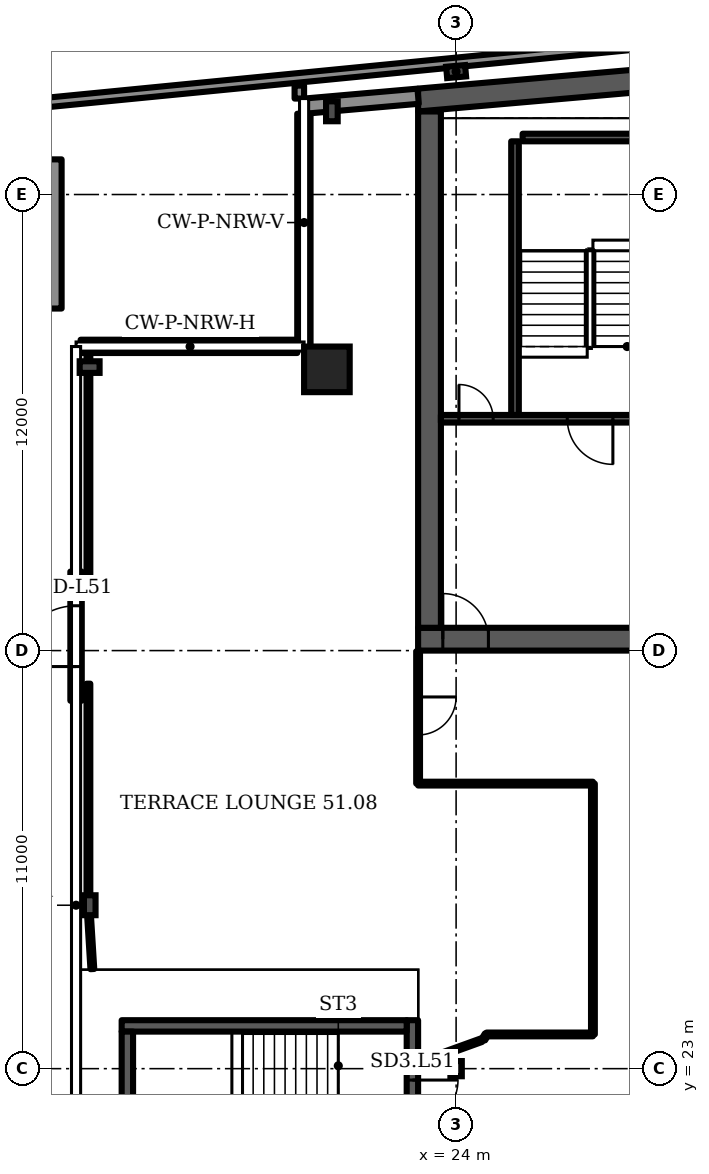
"""IFC4 building model, lengths in metres.
Left out: names, types, materials, properties, quantities, classifications, styles, units other than length and angle.
Written with IfcOpenShell. Run it as: python <this file> out.ifc"""

import sys

from ifc_helpers import new_model, si_unit, direction, frame, frame_2d, origin, origin_2d, place, context, subcontext, project, spatial, polyline, rectangle, i_section, outline, extrude, element, fill, save


model = new_model("IFC4")
c1 = context("Model", 3, precision=1e-05, world=origin(), true_north=direction((0.0, 1.0)))
c2 = subcontext(c1, "Body", "Model", "MODEL_VIEW")
j1 = project(units=[si_unit("LENGTHUNIT", "METRE"), si_unit("PLANEANGLEUNIT", "RADIAN")], contexts=[c1])
p1 = place(None, origin())
s1 = spatial("IfcSite", under=j1, at=p1, CompositionType="ELEMENT")
p2 = place(p1, origin())
s2 = spatial("IfcBuilding", under=s1, at=p2, CompositionType="ELEMENT")
p3 = place(p2, frame((0.0, 0.0, 207.1)))
s3 = spatial("IfcBuildingStorey", under=s2, at=p3, CompositionType="ELEMENT", Elevation=207.1)
p4 = place(p3, frame((0.0, 0.0, -0.0)))
e1 = element("IfcWall", 1, at=p4, inside=s3, PredefinedType="SHEAR", context=c2, shape_type="SweptSolid", body=[
    extrude(outline(polyline([(23.0, 48.185), (40.5, 49.716), (58.0, 48.185), (58.0, 48.787), (40.5, 50.318), (23.0, 48.787), (23.0, 48.185)])), origin(), (0.0, 0.0, 1.0), 3.6),
])
p5 = place(p3, frame((23.0, 34.3, 0.0), z_axis=(0.0, 0.0, 1.0), x_axis=(1.0, 0.0, 0.0)))
e2 = element("IfcWall", 2, at=p5, inside=s3, PredefinedType="SHEAR", context=c2, shape_type="SweptSolid", body=[
    extrude(rectangle(XDim=35.0, YDim=0.6, at=frame_2d((17.5, 0.0))), origin(), (0.0, 0.0, 1.0), 3.6),
])
p6 = place(p5, frame((0.65, 0.0, 0.0)))
e3 = element("IfcOpeningElement", 3, at=p6, cuts=e2, PredefinedType="OPENING", context=c2, shape_type="SweptSolid", body=[
    extrude(rectangle(XDim=1.2, YDim=2.1, at=frame_2d((0.6, 1.05))), frame((0.0, 0.31, 0.0), z_axis=(0.0, -1.0, 0.0), x_axis=(1.0, 0.0, 0.0)), (0.0, 0.0, 1.0), 0.62),
])
p7 = place(p5, frame((7.717, 0.0, 0.0)))
e4 = element("IfcOpeningElement", 4, at=p7, cuts=e2, PredefinedType="OPENING", context=c2, shape_type="SweptSolid", body=[
    extrude(rectangle(XDim=1.1, YDim=2.1, at=frame_2d((0.55, 1.05))), frame((0.0, 0.31, 0.0), z_axis=(0.0, -1.0, 0.0), x_axis=(1.0, 0.0, 0.0)), (0.0, 0.0, 1.0), 0.62),
])
p8 = place(p5, frame((12.183, 0.0, 0.0)))
e5 = element("IfcOpeningElement", 5, at=p8, cuts=e2, PredefinedType="OPENING", context=c2, shape_type="SweptSolid", body=[
    extrude(rectangle(XDim=1.1, YDim=2.1, at=frame_2d((0.55, 1.05))), frame((0.0, 0.31, 0.0), z_axis=(0.0, -1.0, 0.0), x_axis=(1.0, 0.0, 0.0)), (0.0, 0.0, 1.0), 0.62),
])
p9 = place(p5, frame((9.8, 0.0, 0.0)))
e6 = element("IfcOpeningElement", 6, at=p9, cuts=e2, PredefinedType="OPENING", context=c2, shape_type="SweptSolid", body=[
    extrude(rectangle(XDim=1.4, YDim=2.1, at=frame_2d((0.7, 1.05))), frame((0.0, 0.31, 0.0), z_axis=(0.0, -1.0, 0.0), x_axis=(1.0, 0.0, 0.0)), (0.0, 0.0, 1.0), 0.62),
])
p10 = place(p5, frame((14.717, 0.0, 0.0)))
e7 = element("IfcOpeningElement", 7, at=p10, cuts=e2, PredefinedType="OPENING", context=c2, shape_type="SweptSolid", body=[
    extrude(rectangle(XDim=1.1, YDim=2.1, at=frame_2d((0.55, 1.05))), frame((0.0, 0.31, 0.0), z_axis=(0.0, -1.0, 0.0), x_axis=(1.0, 0.0, 0.0)), (0.0, 0.0, 1.0), 0.62),
])
p11 = place(p5, frame((16.95, 0.0, 0.0)))
e8 = element("IfcOpeningElement", 8, at=p11, cuts=e2, PredefinedType="OPENING", context=c2, shape_type="SweptSolid", body=[
    extrude(rectangle(XDim=1.1, YDim=2.1, at=frame_2d((0.55, 1.05))), frame((0.0, 0.31, 0.0), z_axis=(0.0, -1.0, 0.0), x_axis=(1.0, 0.0, 0.0)), (0.0, 0.0, 1.0), 0.62),
])
p12 = place(p5, frame((19.183, 0.0, 0.0)))
e9 = element("IfcOpeningElement", 9, at=p12, cuts=e2, PredefinedType="OPENING", context=c2, shape_type="SweptSolid", body=[
    extrude(rectangle(XDim=1.1, YDim=2.1, at=frame_2d((0.55, 1.05))), frame((0.0, 0.31, 0.0), z_axis=(0.0, -1.0, 0.0), x_axis=(1.0, 0.0, 0.0)), (0.0, 0.0, 1.0), 0.62),
])
p13 = place(p5, frame((26.15, 0.0, 0.0)))
e10 = element("IfcOpeningElement", 10, at=p13, cuts=e2, PredefinedType="OPENING", context=c2, shape_type="SweptSolid", body=[
    extrude(rectangle(XDim=1.2, YDim=2.1, at=frame_2d((0.6, 1.05))), frame((0.0, 0.31, 0.0), z_axis=(0.0, -1.0, 0.0), x_axis=(1.0, 0.0, 0.0)), (0.0, 0.0, 1.0), 0.62),
])
p14 = place(p5, frame((28.767, 0.0, 0.0)))
e11 = element("IfcOpeningElement", 11, at=p14, cuts=e2, PredefinedType="OPENING", context=c2, shape_type="SweptSolid", body=[
    extrude(rectangle(XDim=1.0, YDim=2.1, at=frame_2d((0.5, 1.05))), frame((0.0, 0.31, 0.0), z_axis=(0.0, -1.0, 0.0), x_axis=(1.0, 0.0, 0.0)), (0.0, 0.0, 1.0), 0.62),
])
p15 = place(p5, frame((33.083, 0.0, 0.0)))
e12 = element("IfcOpeningElement", 12, at=p15, cuts=e2, PredefinedType="OPENING", context=c2, shape_type="SweptSolid", body=[
    extrude(rectangle(XDim=1.0, YDim=2.1, at=frame_2d((0.5, 1.05))), frame((0.0, 0.31, 0.0), z_axis=(0.0, -1.0, 0.0), x_axis=(1.0, 0.0, 0.0)), (0.0, 0.0, 1.0), 0.62),
])
p16 = place(p5, frame((30.8, 0.0, 0.0)))
e13 = element("IfcOpeningElement", 13, at=p16, cuts=e2, PredefinedType="OPENING", context=c2, shape_type="SweptSolid", body=[
    extrude(rectangle(XDim=1.4, YDim=2.1, at=frame_2d((0.7, 1.05))), frame((0.0, 0.31, 0.0), z_axis=(0.0, -1.0, 0.0), x_axis=(1.0, 0.0, 0.0)), (0.0, 0.0, 1.0), 0.62),
])
p17 = place(p3, frame((23.3, 34.6, 0.0), z_axis=(0.0, 0.0, 1.0), x_axis=(0.0, 1.0, 0.0)))
e14 = element("IfcWall", 14, at=p17, inside=s3, PredefinedType="SHEAR", context=c2, shape_type="SweptSolid", body=[
    extrude(rectangle(XDim=13.585, YDim=0.6, at=frame_2d((6.792, 0.0))), origin(), (0.0, 0.0, 1.0), 3.6),
])
p18 = place(p3, frame((20.6, 41.4, 0.0), z_axis=(0.0, 0.0, 1.0), x_axis=(1.0, 0.0, 0.0)))
e15 = element("IfcColumn", 15, at=p18, inside=s3, PredefinedType="COLUMN", context=c2, shape_type="SweptSolid", body=[
    extrude(rectangle(XDim=1.2, YDim=1.2, at=origin_2d()), origin(), (0.0, 0.0, 1.0), 3.6),
])
for number, where, z_axis, x_axis in (
    (16, (20.731, 48.19, 0.0), (0.0, 0.0, 1.0), (-1.0, 0.0, 0.0)),
    (17, (14.357, 41.46, 0.0), (0.0, 0.0, 1.0), (0.0, 1.0, 0.0)),
    (18, (14.36, 27.3, 0.0), (0.0, 0.0, 1.0), (-1.0, 0.0, 0.0)),
):
    element("IfcColumn", number, at=place(p3, frame(where, z_axis=z_axis, x_axis=x_axis)), inside=s3, PredefinedType="COLUMN", context=c2, shape_type="SweptSolid", body=[
        extrude(i_section(OverallWidth=0.306, OverallDepth=0.524, WebThickness=0.021, FlangeThickness=0.04, FilletRadius=0.027, at=origin_2d()), origin(), (0.0, 0.0, 1.0), 3.6),
    ])
p19 = place(p3, frame((24.0, 23.0, 0.0), z_axis=(0.0, 0.0, 1.0), x_axis=(1.0, 0.0, 0.0)))
e19 = element("IfcColumn", 19, at=p19, inside=s3, PredefinedType="COLUMN", context=c2, shape_type="SweptSolid", body=[
    extrude(i_section(OverallWidth=0.3, OverallDepth=0.4, WebThickness=0.013, FlangeThickness=0.024, FilletRadius=0.027, at=origin_2d()), origin(), (0.0, 0.0, 1.0), 3.6),
])
p20 = place(p3, frame((24.0, 49.235, 0.0), z_axis=(0.0, 0.0, 1.0), x_axis=(-0.087156, 0.996197, 0.0)))
e20 = element("IfcColumn", 20, at=p20, inside=s3, PredefinedType="COLUMN", context=c2, shape_type="SweptSolid", body=[
    extrude(i_section(OverallWidth=0.3, OverallDepth=0.5, WebThickness=0.014, FlangeThickness=0.028, FilletRadius=0.027, at=origin_2d()), origin(), (0.0, 0.0, 1.0), 3.6),
])
p21 = place(p3, frame((23.0, 48.587, 0.0), z_axis=(0.0, 0.0, 1.0), x_axis=(-0.996194, -0.087168, 0.0)))
e21 = element("IfcWall", 21, at=p21, inside=s3, PredefinedType="SOLIDWALL", context=c2, shape_type="SweptSolid", body=[
    extrude(rectangle(XDim=2.994, YDim=0.4, at=frame_2d((1.497, 0.0))), origin(), (0.0, 0.0, 1.0), 3.2),
])
p22 = place(p3, frame((13.135, 48.413, 0.0), z_axis=(0.0, 0.0, 1.0), x_axis=(0.995233, 0.097487, 0.0)))
e22 = element("IfcWall", 22, at=p22, inside=s3, PredefinedType="PARAPET", context=c2, shape_type="SweptSolid", body=[
    extrude(rectangle(XDim=23.979, YDim=0.25, at=frame_2d((11.99, 0.0))), origin(), (0.0, 0.0, 1.0), 1.1),
])
p23 = place(p3, frame((19.875, 48.525, 0.0), z_axis=(0.0, 0.0, 1.0), x_axis=(0.0, 1.0, 0.0)))
e23 = element("IfcWall", 23, at=p23, inside=s3, PredefinedType="PARAPET", context=c2, shape_type="SweptSolid", body=[
    extrude(rectangle(XDim=0.341, YDim=0.25, at=frame_2d((0.17, 0.0))), origin(), (0.0, 0.0, 1.0), 1.1),
])
p24 = place(p3, frame((13.32, 43.0, 0.0), z_axis=(0.0, 0.0, 1.0), x_axis=(0.0, 1.0, 0.0)))
e24 = element("IfcWall", 24, at=p24, inside=s3, PredefinedType="SOLIDWALL", context=c2, shape_type="SweptSolid", body=[
    extrude(rectangle(XDim=3.925, YDim=0.6, at=frame_2d((1.962, 0.0))), origin(), (0.0, 0.0, 1.0), 0.8),
])
p25 = place(p3, frame((19.995, 48.126, 0.0), z_axis=(0.0, 0.0, 1.0), x_axis=(0.0, -1.0, 0.0)))
e25 = element("IfcWall", 25, at=p25, inside=s3, PredefinedType="SOLIDWALL", context=c2, shape_type="SweptSolid", body=[
    extrude(rectangle(XDim=6.126, YDim=0.35, at=frame_2d((3.063, 0.0))), origin(), (0.0, 0.0, 1.0), 1.0),
])
p26 = place(p3, frame((19.82, 42.005, 0.0), z_axis=(0.0, 0.0, 1.0), x_axis=(-1.0, 0.0, 0.0)))
e26 = element("IfcWall", 26, at=p26, inside=s3, PredefinedType="SOLIDWALL", context=c2, shape_type="SweptSolid", body=[
    extrude(rectangle(XDim=5.7, YDim=0.35, at=frame_2d((2.85, 0.0))), origin(), (0.0, 0.0, 1.0), 1.0),
])
p27 = place(p3, frame((23.6, 40.1, 0.0), z_axis=(0.0, 0.0, 1.0), x_axis=(1.0, 0.0, 0.0)))
e27 = element("IfcWall", 27, at=p27, inside=s3, PredefinedType="SHEAR", context=c2, shape_type="SweptSolid", body=[
    extrude(rectangle(XDim=6.1, YDim=0.2, at=frame_2d((3.05, 0.0))), origin(), (0.0, 0.0, 1.0), 3.2),
])
p28 = place(p27, frame((3.325, 0.0, 0.0)))
e28 = element("IfcOpeningElement", 28, at=p28, cuts=e27, PredefinedType="OPENING", context=c2, shape_type="SweptSolid", body=[
    extrude(rectangle(XDim=1.2, YDim=2.1, at=frame_2d((0.6, 1.05))), frame((0.0, 0.11, 0.0), z_axis=(0.0, -1.0, 0.0), x_axis=(1.0, 0.0, 0.0)), (0.0, 0.0, 1.0), 0.22),
])
p29 = place(p27, frame((0.475, 0.0, 0.0)))
e29 = element("IfcOpeningElement", 29, at=p29, cuts=e27, PredefinedType="OPENING", context=c2, shape_type="SweptSolid", body=[
    extrude(rectangle(XDim=0.9, YDim=2.1, at=frame_2d((0.45, 1.05))), frame((0.0, 0.11, 0.0), z_axis=(0.0, -1.0, 0.0), x_axis=(1.0, 0.0, 0.0)), (0.0, 0.0, 1.0), 0.22),
])
p30 = place(p3, frame((25.55, 40.2, 0.0), z_axis=(0.0, 0.0, 1.0), x_axis=(0.0, 1.0, 0.0)))
e30 = element("IfcWall", 30, at=p30, inside=s3, PredefinedType="SHEAR", context=c2, shape_type="SweptSolid", body=[
    extrude(rectangle(XDim=7.2, YDim=0.2, at=frame_2d((3.6, 0.0))), origin(), (0.0, 0.0, 1.0), 3.2),
])
p31 = place(p3, frame((25.75, 47.5, 0.0), z_axis=(0.0, 0.0, 1.0), x_axis=(1.0, 0.0, 0.0)))
e31 = element("IfcWall", 31, at=p31, inside=s3, PredefinedType="SHEAR", context=c2, shape_type="SweptSolid", body=[
    extrude(rectangle(XDim=3.95, YDim=0.2, at=frame_2d((1.975, 0.0))), origin(), (0.0, 0.0, 1.0), 3.2),
])
p32 = place(p3, frame((22.85, 19.925, 0.0), z_axis=(0.0, 0.0, 1.0), x_axis=(0.0, 1.0, 0.0)))
e32 = element("IfcWall", 32, at=p32, inside=s3, PredefinedType="SHEAR", context=c2, shape_type="SweptSolid", body=[
    extrude(rectangle(XDim=4.35, YDim=0.3, at=frame_2d((2.175, 0.0))), origin(), (0.0, 0.0, 1.0), 3.2),
])
p33 = place(p32, frame((1.575, 0.0, 0.0)))
e33 = element("IfcOpeningElement", 33, at=p33, cuts=e32, PredefinedType="OPENING", context=c2, shape_type="SweptSolid", body=[
    extrude(rectangle(XDim=1.2, YDim=2.1, at=frame_2d((0.6, 1.05))), frame((0.0, 0.16, 0.0), z_axis=(0.0, -1.0, 0.0), x_axis=(1.0, 0.0, 0.0)), (0.0, 0.0, 1.0), 0.32),
])
p34 = place(p3, frame((14.325, 33.13, 0.0), z_axis=(0.0, 0.0, 1.0), x_axis=(0.0, -1.0, 0.0)))
e34 = element("IfcWall", 34, at=p34, inside=s3, PredefinedType="PARTITIONING", context=c2, shape_type="SweptSolid", body=[
    extrude(rectangle(XDim=5.83, YDim=0.1, at=frame_2d((2.915, 0.0))), origin(), (0.0, 0.0, 1.0), 2.58),
])
p35 = place(p3, frame((14.325, 41.98, 0.0), z_axis=(0.0, 0.0, 1.0), x_axis=(0.0, -1.0, 0.0)))
e35 = element("IfcWall", 35, at=p35, inside=s3, PredefinedType="PARTITIONING", context=c2, shape_type="SweptSolid", body=[
    extrude(rectangle(XDim=6.35, YDim=0.1, at=frame_2d((3.175, 0.0))), origin(), (0.0, 0.0, 1.0), 2.58),
])
p36 = place(p3, frame((14.429, 25.62, 0.0), z_axis=(0.0, 0.0, 1.0), x_axis=(-0.061647, 0.998101, 0.0)))
e36 = element("IfcWall", 36, at=p36, inside=s3, PredefinedType="PARTITIONING", context=c2, shape_type="SweptSolid", body=[
    extrude(rectangle(XDim=1.683, YDim=0.1, at=frame_2d((0.842, 0.0))), origin(), (0.0, 0.0, 1.0), 2.58),
])
p37 = place(p3, frame((23.0, 30.5, 0.0), z_axis=(0.0, 0.0, 1.0), x_axis=(0.0, 1.0, 0.0)))
e37 = element("IfcWall", 37, at=p37, inside=s3, PredefinedType="PARTITIONING", context=c2, shape_type="SweptSolid", body=[
    extrude(rectangle(XDim=3.48, YDim=0.1, at=frame_2d((1.74, 0.0))), origin(), (0.0, 0.0, 1.0), 3.2),
])
p38 = place(p37, frame((1.28, 0.0, 0.0)))
e38 = element("IfcOpeningElement", 38, at=p38, cuts=e37, PredefinedType="OPENING", context=c2, shape_type="SweptSolid", body=[
    extrude(rectangle(XDim=1.0, YDim=2.1, at=frame_2d((0.5, 1.05))), frame((0.0, 0.06, 0.0), z_axis=(0.0, -1.0, 0.0), x_axis=(1.0, 0.0, 0.0)), (0.0, 0.0, 1.0), 0.12),
])
p39 = place(p3, frame((23.0, 30.5, 0.0), z_axis=(0.0, 0.0, 1.0), x_axis=(1.0, 0.0, 0.0)))
e39 = element("IfcWall", 39, at=p39, inside=s3, PredefinedType="PARTITIONING", context=c2, shape_type="SweptSolid", body=[
    extrude(rectangle(XDim=4.6, YDim=0.1, at=frame_2d((2.3, 0.0))), origin(), (0.0, 0.0, 1.0), 3.2),
])
p40 = place(p3, frame((23.285, 23.25, 0.0), z_axis=(0.0, 0.0, 1.0), x_axis=(0.940585, 0.339559, 0.0)))
e40 = element("IfcWall", 40, at=p40, inside=s3, PredefinedType="PARTITIONING", context=c2, shape_type="SweptSolid", body=[
    extrude(rectangle(XDim=1.472, YDim=0.1, at=frame_2d((0.736, 0.0))), origin(), (0.0, 0.0, 1.0), 3.2),
])
p41 = place(p3, frame((24.72, 23.77, 0.0), z_axis=(0.0, 0.0, 1.0), x_axis=(0.524813, 0.851221, 0.0)))
e41 = element("IfcWall", 41, at=p41, inside=s3, PredefinedType="PARTITIONING", context=c2, shape_type="SweptSolid", body=[
    extrude(rectangle(XDim=0.153, YDim=0.1, at=frame_2d((0.076, 0.0))), origin(), (0.0, 0.0, 1.0), 3.2),
])
p42 = place(p3, frame((24.8, 23.9, 0.0), z_axis=(0.0, 0.0, 1.0), x_axis=(1.0, 0.0, 0.0)))
e42 = element("IfcWall", 42, at=p42, inside=s3, PredefinedType="PARTITIONING", context=c2, shape_type="SweptSolid", body=[
    extrude(rectangle(XDim=2.8, YDim=0.1, at=frame_2d((1.4, 0.0))), origin(), (0.0, 0.0, 1.0), 3.2),
])
p43 = place(p3, frame((27.6, 23.9, 0.0), z_axis=(0.0, 0.0, 1.0), x_axis=(0.0, 1.0, 0.0)))
e43 = element("IfcWall", 43, at=p43, inside=s3, PredefinedType="PARTITIONING", context=c2, shape_type="SweptSolid", body=[
    extrude(rectangle(XDim=6.6, YDim=0.1, at=frame_2d((3.3, 0.0))), origin(), (0.0, 0.0, 1.0), 3.2),
])
p44 = place(p3, frame((14.0, 32.68, 0.0), z_axis=(0.0, 0.0, 1.0), x_axis=(0.0, 1.0, 0.0)))
e44 = element("IfcWall", 44, at=p44, inside=s3, PredefinedType="SOLIDWALL", context=c2, shape_type="SweptSolid", body=[
    extrude(rectangle(XDim=3.4, YDim=0.3, at=frame_2d((1.7, 0.0))), origin(), (0.0, 0.0, 1.0), 3.2),
])
p45 = place(p44, frame((0.9, 0.0, 0.0)))
e45 = element("IfcOpeningElement", 45, at=p45, cuts=e44, PredefinedType="OPENING", context=c2, shape_type="SweptSolid", body=[
    extrude(rectangle(XDim=1.6, YDim=2.1, at=frame_2d((0.8, 1.05))), frame((0.0, 0.16, 0.0), z_axis=(0.0, -1.0, 0.0), x_axis=(1.0, 0.0, 0.0)), (0.0, 0.0, 1.0), 0.32),
])
p46 = place(p3, frame((15.2, 24.125, 0.0), z_axis=(0.0, 0.0, 1.0), x_axis=(1.0, 0.0, 0.0)))
e46 = element("IfcWall", 46, at=p46, inside=s3, PredefinedType="SHEAR", context=c2, shape_type="SweptSolid", body=[
    extrude(rectangle(XDim=7.5, YDim=0.3, at=frame_2d((3.75, 0.0))), origin(), (0.0, 0.0, 1.0), 3.2),
])
p47 = place(p3, frame((15.35, 20.225, 0.0), z_axis=(0.0, 0.0, 1.0), x_axis=(0.0, 1.0, 0.0)))
e47 = element("IfcWall", 47, at=p47, inside=s3, PredefinedType="SHEAR", context=c2, shape_type="SweptSolid", body=[
    extrude(rectangle(XDim=3.75, YDim=0.3, at=frame_2d((1.875, 0.0))), origin(), (0.0, 0.0, 1.0), 3.2),
])
p48 = place(p28, origin())
e48 = element("IfcDoor", 48, at=p48, inside=s3, OperationType="SINGLE_SWING_RIGHT", PredefinedType="DOOR", context=c2, shape_type="SweptSolid", body=[
    extrude(rectangle(XDim=1.2, YDim=2.1, at=frame_2d((0.6, 1.05))), frame((0.0, 0.025, 0.0), z_axis=(0.0, -1.0, 0.0), x_axis=(1.0, 0.0, 0.0)), (0.0, 0.0, 1.0), 0.05),
])
fill(e28, e48)
p49 = place(p29, origin())
e49 = element("IfcDoor", 49, at=p49, inside=s3, OperationType="SINGLE_SWING_LEFT", PredefinedType="DOOR", context=c2, shape_type="SweptSolid", body=[
    extrude(rectangle(XDim=0.9, YDim=2.1, at=frame_2d((0.45, 1.05))), frame((0.0, 0.025, 0.0), z_axis=(0.0, -1.0, 0.0), x_axis=(1.0, 0.0, 0.0)), (0.0, 0.0, 1.0), 0.05),
])
fill(e29, e49)
p50 = place(p6, origin())
e50 = element("IfcDoor", 50, at=p50, inside=s3, OperationType="SINGLE_SWING_LEFT", PredefinedType="DOOR", context=c2, shape_type="SweptSolid", body=[
    extrude(rectangle(XDim=1.2, YDim=2.1, at=frame_2d((0.6, 1.05))), frame((0.0, 0.025, 0.0), z_axis=(0.0, -1.0, 0.0), x_axis=(1.0, 0.0, 0.0)), (0.0, 0.0, 1.0), 0.05),
])
fill(e3, e50)
p51 = place(p33, origin())
e51 = element("IfcDoor", 51, at=p51, inside=s3, OperationType="SINGLE_SWING_RIGHT", PredefinedType="DOOR", context=c2, shape_type="SweptSolid", body=[
    extrude(rectangle(XDim=1.2, YDim=2.1, at=frame_2d((0.6, 1.05))), frame((0.0, 0.025, 0.0), z_axis=(0.0, -1.0, 0.0), x_axis=(1.0, 0.0, 0.0)), (0.0, 0.0, 1.0), 0.05),
])
fill(e33, e51)
p52 = place(p38, origin())
e52 = element("IfcDoor", 52, at=p52, inside=s3, OperationType="SINGLE_SWING_RIGHT", PredefinedType="DOOR", context=c2, shape_type="SweptSolid", body=[
    extrude(rectangle(XDim=1.0, YDim=2.1, at=frame_2d((0.5, 1.05))), frame((0.0, 0.025, 0.0), z_axis=(0.0, -1.0, 0.0), x_axis=(1.0, 0.0, 0.0)), (0.0, 0.0, 1.0), 0.05),
])
fill(e38, e52)
p53 = place(p45, origin())
e53 = element("IfcDoor", 53, at=p53, inside=s3, OperationType="DOUBLE_DOOR_SINGLE_SWING", PredefinedType="DOOR", context=c2, shape_type="SweptSolid", body=[
    extrude(rectangle(XDim=1.6, YDim=2.1, at=frame_2d((0.8, 1.05))), frame((0.0, 0.025, 0.0), z_axis=(0.0, -1.0, 0.0), x_axis=(1.0, 0.0, 0.0)), (0.0, 0.0, 1.0), 0.05),
])
fill(e45, e53)
save(model, sys.argv[1])
